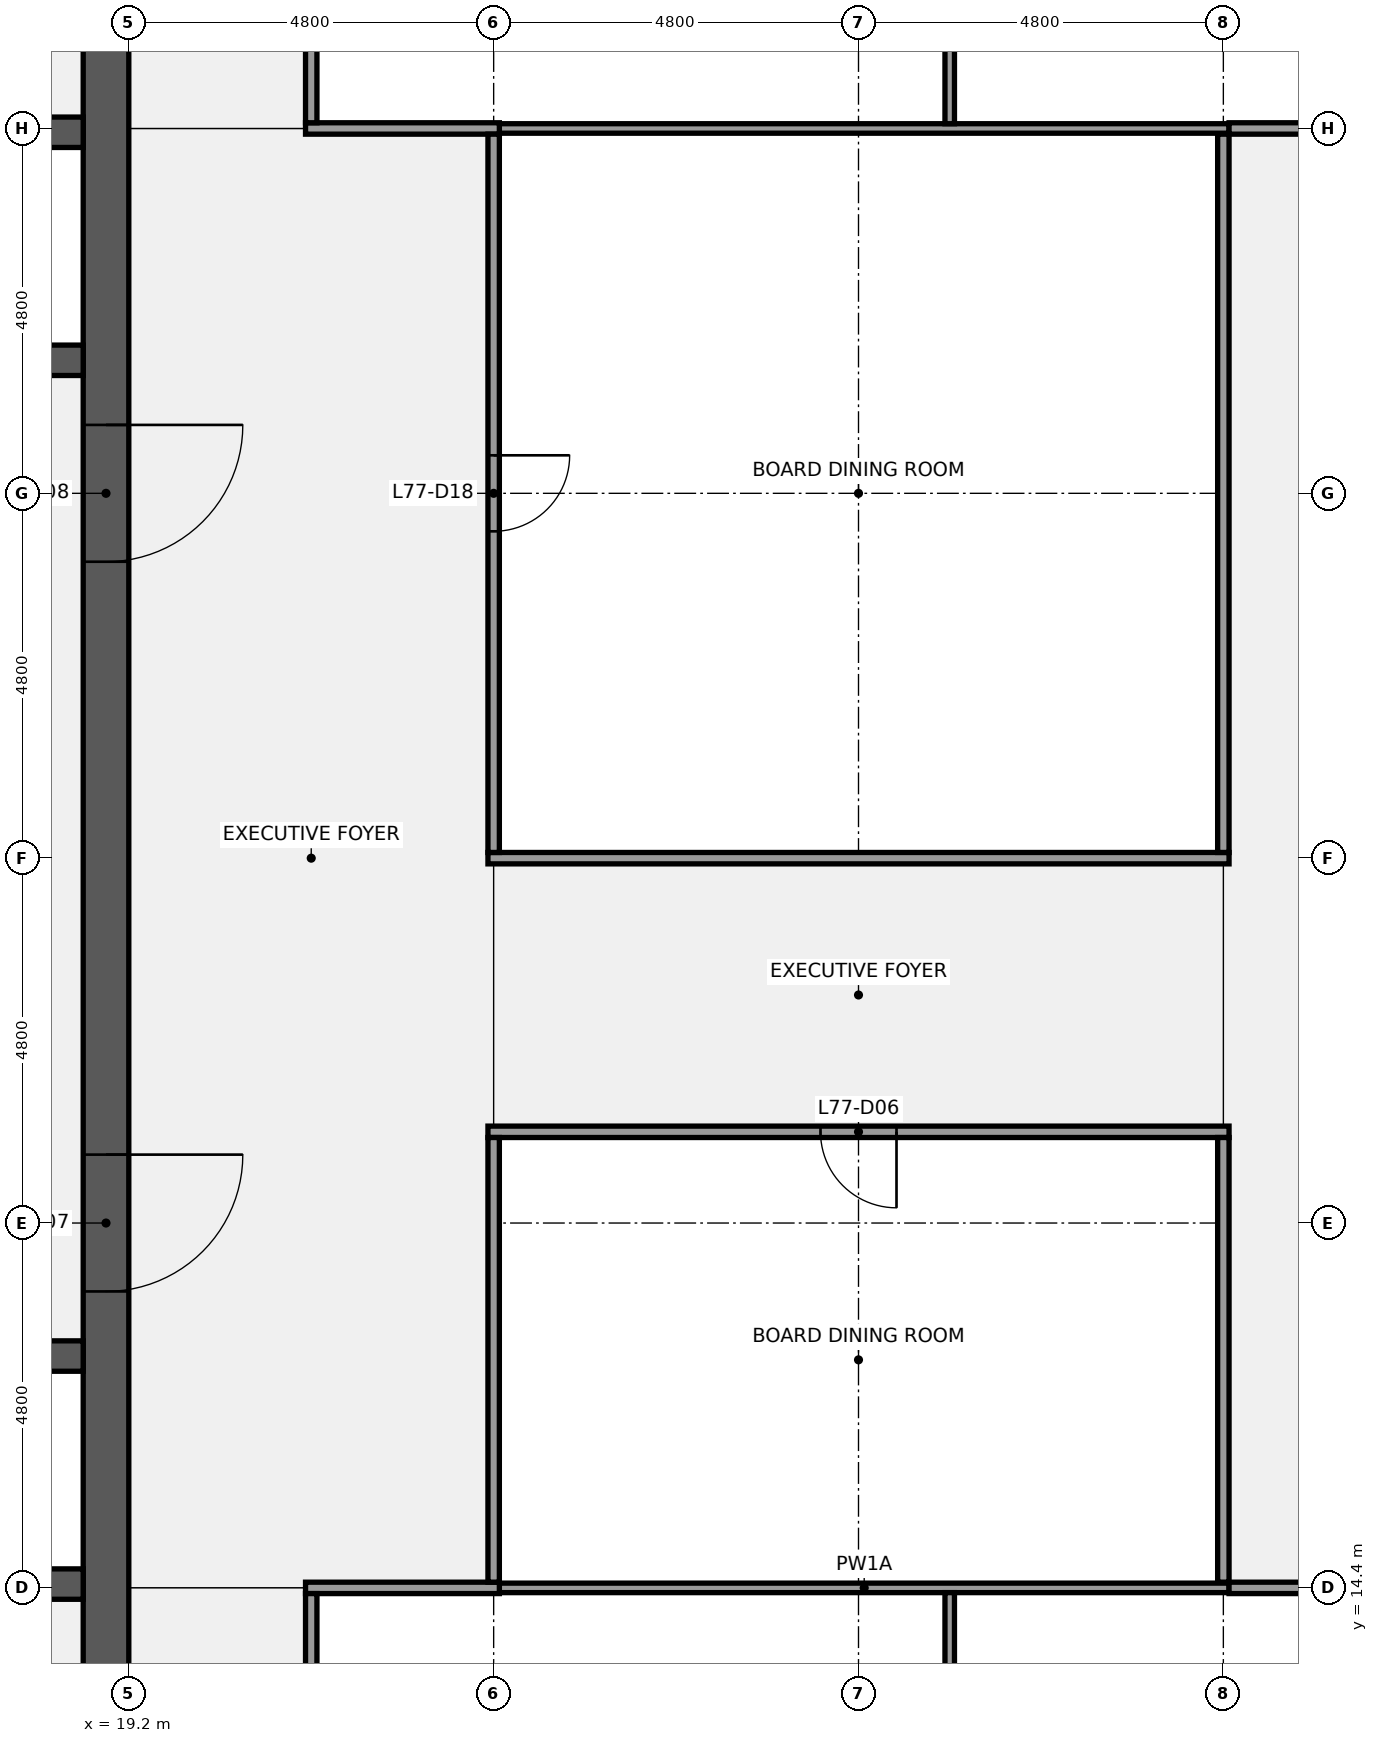
"""IFC4 building model, lengths in metres.
Left out: names, types, materials, properties, quantities, classifications, styles, units other than length and angle.
Written with IfcOpenShell. Run it as: python <this file> out.ifc"""

import sys

from ifc_helpers import new_model, si_unit, direction, frame, frame_2d, origin, place, context, subcontext, project, spatial, rectangle, extrude, element, fill, save


model = new_model("IFC4")
c1 = context("Model", 3, precision=1e-05, world=origin(), true_north=direction((0.0, 1.0)))
c2 = subcontext(c1, "Body", "Model", "MODEL_VIEW")
j1 = project(units=[si_unit("LENGTHUNIT", "METRE"), si_unit("PLANEANGLEUNIT", "RADIAN")], contexts=[c1])
p1 = place(None, origin())
s1 = spatial("IfcSite", under=j1, at=p1, CompositionType="ELEMENT")
p2 = place(p1, origin())
s2 = spatial("IfcBuilding", under=s1, at=p2, CompositionType="ELEMENT")
p3 = place(p2, frame((0.0, 0.0, 346.3)))
s3 = spatial("IfcBuildingStorey", under=s2, at=p3, CompositionType="ELEMENT", Elevation=346.3)
p4 = place(p3, frame((18.9, 38.4, 0.0), z_axis=(0.0, 0.0, 1.0), x_axis=(0.0, -1.0, 0.0)))
e1 = element("IfcWall", 1, at=p4, inside=s3, PredefinedType="SHEAR", context=c2, shape_type="SweptSolid", body=[
    extrude(rectangle(XDim=28.8, YDim=0.6, at=frame_2d((14.4, 0.0))), origin(), (0.0, 0.0, 1.0), 3.84),
])
p5 = place(p4, frame((18.3, 0.0, 0.0)))
e2 = element("IfcOpeningElement", 2, at=p5, cuts=e1, PredefinedType="OPENING", context=c2, shape_type="SweptSolid", body=[
    extrude(rectangle(XDim=1.8, YDim=2.1, at=frame_2d((0.9, 1.05))), frame((0.0, 0.31, 0.0), z_axis=(0.0, -1.0, 0.0), x_axis=(1.0, 0.0, 0.0)), (0.0, 0.0, 1.0), 0.62),
])
p6 = place(p4, frame((8.7, 0.0, 0.0)))
e3 = element("IfcOpeningElement", 3, at=p6, cuts=e1, PredefinedType="OPENING", context=c2, shape_type="SweptSolid", body=[
    extrude(rectangle(XDim=1.8, YDim=2.1, at=frame_2d((0.9, 1.05))), frame((0.0, 0.31, 0.0), z_axis=(0.0, -1.0, 0.0), x_axis=(1.0, 0.0, 0.0)), (0.0, 0.0, 1.0), 0.62),
])
p7 = place(p3, frame((0.6, 14.45, 0.0), z_axis=(0.0, 0.0, 1.0), x_axis=(1.0, 0.0, 0.0)))
e4 = element("IfcWall", 4, at=p7, inside=s3, PredefinedType="SHEAR", context=c2, shape_type="SweptSolid", body=[
    extrude(rectangle(XDim=18.0, YDim=0.4, at=frame_2d((9.0, 0.0))), origin(), (0.0, 0.0, 1.0), 3.84),
])
p8 = place(p3, frame((0.6, 17.45, 0.0), z_axis=(0.0, 0.0, 1.0), x_axis=(1.0, 0.0, 0.0)))
e5 = element("IfcWall", 5, at=p8, inside=s3, PredefinedType="SHEAR", context=c2, shape_type="SweptSolid", body=[
    extrude(rectangle(XDim=18.0, YDim=0.4, at=frame_2d((9.0, 0.0))), origin(), (0.0, 0.0, 1.0), 3.84),
])
p9 = place(p8, frame((3.363, 0.0, 0.0)))
e6 = element("IfcOpeningElement", 6, at=p9, cuts=e5, PredefinedType="OPENING", context=c2, shape_type="SweptSolid", body=[
    extrude(rectangle(XDim=1.0, YDim=2.1, at=frame_2d((0.5, 1.05))), frame((0.0, 0.21, 0.0), z_axis=(0.0, -1.0, 0.0), x_axis=(1.0, 0.0, 0.0)), (0.0, 0.0, 1.0), 0.42),
])
p10 = place(p8, frame((9.1, 0.0, 0.0)))
e7 = element("IfcOpeningElement", 7, at=p10, cuts=e5, PredefinedType="OPENING", context=c2, shape_type="SweptSolid", body=[
    extrude(rectangle(XDim=1.0, YDim=2.1, at=frame_2d((0.5, 1.05))), frame((0.0, 0.21, 0.0), z_axis=(0.0, -1.0, 0.0), x_axis=(1.0, 0.0, 0.0)), (0.0, 0.0, 1.0), 0.42),
])
p11 = place(p8, frame((12.4, 0.0, 0.0)))
e8 = element("IfcOpeningElement", 8, at=p11, cuts=e5, PredefinedType="OPENING", context=c2, shape_type="SweptSolid", body=[
    extrude(rectangle(XDim=1.0, YDim=2.1, at=frame_2d((0.5, 1.05))), frame((0.0, 0.21, 0.0), z_axis=(0.0, -1.0, 0.0), x_axis=(1.0, 0.0, 0.0)), (0.0, 0.0, 1.0), 0.42),
])
p12 = place(p8, frame((15.738, 0.0, 0.0)))
e9 = element("IfcOpeningElement", 9, at=p12, cuts=e5, PredefinedType="OPENING", context=c2, shape_type="SweptSolid", body=[
    extrude(rectangle(XDim=1.0, YDim=2.1, at=frame_2d((0.5, 1.05))), frame((0.0, 0.21, 0.0), z_axis=(0.0, -1.0, 0.0), x_axis=(1.0, 0.0, 0.0)), (0.0, 0.0, 1.0), 0.42),
])
p13 = place(p3, frame((0.6, 30.55, 0.0), z_axis=(0.0, 0.0, 1.0), x_axis=(1.0, 0.0, 0.0)))
e10 = element("IfcWall", 10, at=p13, inside=s3, PredefinedType="SHEAR", context=c2, shape_type="SweptSolid", body=[
    extrude(rectangle(XDim=18.0, YDim=0.4, at=frame_2d((9.0, 0.0))), origin(), (0.0, 0.0, 1.0), 3.84),
])
p14 = place(p13, frame((1.6, 0.0, 0.0)))
e11 = element("IfcOpeningElement", 11, at=p14, cuts=e10, PredefinedType="OPENING", context=c2, shape_type="SweptSolid", body=[
    extrude(rectangle(XDim=1.2, YDim=2.1, at=frame_2d((0.6, 1.05))), frame((0.0, 0.21, 0.0), z_axis=(0.0, -1.0, 0.0), x_axis=(1.0, 0.0, 0.0)), (0.0, 0.0, 1.0), 0.42),
])
p15 = place(p13, frame((4.2, 0.0, 0.0)))
e12 = element("IfcOpeningElement", 12, at=p15, cuts=e10, PredefinedType="OPENING", context=c2, shape_type="SweptSolid", body=[
    extrude(rectangle(XDim=1.2, YDim=2.1, at=frame_2d((0.6, 1.05))), frame((0.0, 0.21, 0.0), z_axis=(0.0, -1.0, 0.0), x_axis=(1.0, 0.0, 0.0)), (0.0, 0.0, 1.0), 0.42),
])
p16 = place(p13, frame((6.8, 0.0, 0.0)))
e13 = element("IfcOpeningElement", 13, at=p16, cuts=e10, PredefinedType="OPENING", context=c2, shape_type="SweptSolid", body=[
    extrude(rectangle(XDim=1.2, YDim=2.1, at=frame_2d((0.6, 1.05))), frame((0.0, 0.21, 0.0), z_axis=(0.0, -1.0, 0.0), x_axis=(1.0, 0.0, 0.0)), (0.0, 0.0, 1.0), 0.42),
])
p17 = place(p13, frame((10.0, 0.0, 0.0)))
e14 = element("IfcOpeningElement", 14, at=p17, cuts=e10, PredefinedType="OPENING", context=c2, shape_type="SweptSolid", body=[
    extrude(rectangle(XDim=1.2, YDim=2.1, at=frame_2d((0.6, 1.05))), frame((0.0, 0.21, 0.0), z_axis=(0.0, -1.0, 0.0), x_axis=(1.0, 0.0, 0.0)), (0.0, 0.0, 1.0), 0.42),
])
p18 = place(p13, frame((12.6, 0.0, 0.0)))
e15 = element("IfcOpeningElement", 15, at=p18, cuts=e10, PredefinedType="OPENING", context=c2, shape_type="SweptSolid", body=[
    extrude(rectangle(XDim=1.2, YDim=2.1, at=frame_2d((0.6, 1.05))), frame((0.0, 0.21, 0.0), z_axis=(0.0, -1.0, 0.0), x_axis=(1.0, 0.0, 0.0)), (0.0, 0.0, 1.0), 0.42),
])
p19 = place(p13, frame((15.2, 0.0, 0.0)))
e16 = element("IfcOpeningElement", 16, at=p19, cuts=e10, PredefinedType="OPENING", context=c2, shape_type="SweptSolid", body=[
    extrude(rectangle(XDim=1.2, YDim=2.1, at=frame_2d((0.6, 1.05))), frame((0.0, 0.21, 0.0), z_axis=(0.0, -1.0, 0.0), x_axis=(1.0, 0.0, 0.0)), (0.0, 0.0, 1.0), 0.42),
])
p20 = place(p3, frame((0.6, 33.55, 0.0), z_axis=(0.0, 0.0, 1.0), x_axis=(1.0, 0.0, 0.0)))
e17 = element("IfcWall", 17, at=p20, inside=s3, PredefinedType="SHEAR", context=c2, shape_type="SweptSolid", body=[
    extrude(rectangle(XDim=18.0, YDim=0.4, at=frame_2d((9.0, 0.0))), origin(), (0.0, 0.0, 1.0), 3.84),
])
p21 = place(p3, frame((24.075, 14.4, 0.0), z_axis=(0.0, 0.0, 1.0), x_axis=(1.0, 0.0, 0.0)))
e18 = element("IfcWall", 18, at=p21, inside=s3, PredefinedType="PARTITIONING", context=c2, shape_type="SweptSolid", body=[
    extrude(rectangle(XDim=9.6, YDim=0.125, at=frame_2d((4.8, 0.0))), origin(), (0.0, 0.0, 1.0), 2.849),
])
p22 = place(p3, frame((21.525, 14.4, 0.0), z_axis=(0.0, 0.0, 1.0), x_axis=(1.0, 0.0, 0.0)))
e19 = element("IfcWall", 19, at=p22, inside=s3, PredefinedType="PARTITIONING", context=c2, shape_type="SweptSolid", body=[
    extrude(rectangle(XDim=2.55, YDim=0.15, at=frame_2d((1.275, 0.0))), origin(), (0.0, 0.0, 1.0), 2.849),
])
p23 = place(p3, frame((33.675, 14.4, 0.0), z_axis=(0.0, 0.0, 1.0), x_axis=(1.0, 0.0, 0.0)))
e20 = element("IfcWall", 20, at=p23, inside=s3, PredefinedType="PARTITIONING", context=c2, shape_type="SweptSolid", body=[
    extrude(rectangle(XDim=2.4, YDim=0.15, at=frame_2d((1.2, 0.0))), origin(), (0.0, 0.0, 1.0), 2.849),
])
p24 = place(p3, frame((23.925, 20.4, 0.0), z_axis=(0.0, 0.0, 1.0), x_axis=(1.0, 0.0, 0.0)))
e21 = element("IfcWall", 21, at=p24, inside=s3, PredefinedType="PARTITIONING", context=c2, shape_type="SweptSolid", body=[
    extrude(rectangle(XDim=9.75, YDim=0.15, at=frame_2d((4.875, 0.0))), origin(), (0.0, 0.0, 1.0), 2.849),
])
p25 = place(p24, frame((4.375, 0.0, 0.0)))
e22 = element("IfcOpeningElement", 22, at=p25, cuts=e21, PredefinedType="OPENING", context=c2, shape_type="SweptSolid", body=[
    extrude(rectangle(XDim=1.0, YDim=2.1, at=frame_2d((0.5, 1.05))), frame((0.0, 0.085, 0.0), z_axis=(0.0, -1.0, 0.0), x_axis=(1.0, 0.0, 0.0)), (0.0, 0.0, 1.0), 0.17),
])
p26 = place(p3, frame((23.925, 24.0, 0.0), z_axis=(0.0, 0.0, 1.0), x_axis=(1.0, 0.0, 0.0)))
e23 = element("IfcWall", 23, at=p26, inside=s3, PredefinedType="PARTITIONING", context=c2, shape_type="SweptSolid", body=[
    extrude(rectangle(XDim=9.75, YDim=0.15, at=frame_2d((4.875, 0.0))), origin(), (0.0, 0.0, 1.0), 2.849),
])
p27 = place(p3, frame((24.075, 33.6, 0.0), z_axis=(0.0, 0.0, 1.0), x_axis=(1.0, 0.0, 0.0)))
e24 = element("IfcWall", 24, at=p27, inside=s3, PredefinedType="PARTITIONING", context=c2, shape_type="SweptSolid", body=[
    extrude(rectangle(XDim=9.6, YDim=0.125, at=frame_2d((4.8, 0.0))), origin(), (0.0, 0.0, 1.0), 2.849),
])
p28 = place(p3, frame((21.525, 33.6, 0.0), z_axis=(0.0, 0.0, 1.0), x_axis=(1.0, 0.0, 0.0)))
e25 = element("IfcWall", 25, at=p28, inside=s3, PredefinedType="PARTITIONING", context=c2, shape_type="SweptSolid", body=[
    extrude(rectangle(XDim=2.55, YDim=0.15, at=frame_2d((1.275, 0.0))), origin(), (0.0, 0.0, 1.0), 2.849),
])
p29 = place(p3, frame((33.675, 33.6, 0.0), z_axis=(0.0, 0.0, 1.0), x_axis=(1.0, 0.0, 0.0)))
e26 = element("IfcWall", 26, at=p29, inside=s3, PredefinedType="PARTITIONING", context=c2, shape_type="SweptSolid", body=[
    extrude(rectangle(XDim=2.4, YDim=0.15, at=frame_2d((1.2, 0.0))), origin(), (0.0, 0.0, 1.0), 2.849),
])
for number, where, z_axis, x_axis in (
    (27, (21.6, 9.675, 0.0), (0.0, 0.0, 1.0), (0.0, 1.0, 0.0)),
    (28, (21.6, 33.675, 0.0), (0.0, 0.0, 1.0), (0.0, 1.0, 0.0)),
):
    element("IfcWall", number, at=place(p3, frame(where, z_axis=z_axis, x_axis=x_axis)), inside=s3, PredefinedType="PARTITIONING", context=c2, shape_type="SweptSolid", body=[
        extrude(rectangle(XDim=4.65, YDim=0.15, at=frame_2d((2.325, 0.0))), origin(), (0.0, 0.0, 1.0), 2.849),
    ])
p30 = place(p3, frame((24.0, 14.475, 0.0), z_axis=(0.0, 0.0, 1.0), x_axis=(0.0, 1.0, 0.0)))
e29 = element("IfcWall", 29, at=p30, inside=s3, PredefinedType="PARTITIONING", context=c2, shape_type="SweptSolid", body=[
    extrude(rectangle(XDim=5.85, YDim=0.15, at=frame_2d((2.925, 0.0))), origin(), (0.0, 0.0, 1.0), 2.849),
])
p31 = place(p3, frame((24.0, 24.075, 0.0), z_axis=(0.0, 0.0, 1.0), x_axis=(0.0, 1.0, 0.0)))
e30 = element("IfcWall", 30, at=p31, inside=s3, PredefinedType="PARTITIONING", context=c2, shape_type="SweptSolid", body=[
    extrude(rectangle(XDim=9.45, YDim=0.15, at=frame_2d((4.725, 0.0))), origin(), (0.0, 0.0, 1.0), 2.849),
])
p32 = place(p31, frame((4.225, 0.0, 0.0)))
e31 = element("IfcOpeningElement", 31, at=p32, cuts=e30, PredefinedType="OPENING", context=c2, shape_type="SweptSolid", body=[
    extrude(rectangle(XDim=1.0, YDim=2.1, at=frame_2d((0.5, 1.05))), frame((0.0, 0.085, 0.0), z_axis=(0.0, -1.0, 0.0), x_axis=(1.0, 0.0, 0.0)), (0.0, 0.0, 1.0), 0.17),
])
for number, where, z_axis, x_axis in (
    (32, (30.0, 9.675, 0.0), (0.0, 0.0, 1.0), (0.0, 1.0, 0.0)),
    (33, (30.0, 33.663, 0.0), (0.0, 0.0, 1.0), (0.0, 1.0, 0.0)),
):
    element("IfcWall", number, at=place(p3, frame(where, z_axis=z_axis, x_axis=x_axis)), inside=s3, PredefinedType="PARTITIONING", context=c2, shape_type="SweptSolid", body=[
        extrude(rectangle(XDim=4.662, YDim=0.125, at=frame_2d((2.331, 0.0))), origin(), (0.0, 0.0, 1.0), 2.849),
    ])
p33 = place(p3, frame((33.6, 14.475, 0.0), z_axis=(0.0, 0.0, 1.0), x_axis=(0.0, 1.0, 0.0)))
e34 = element("IfcWall", 34, at=p33, inside=s3, PredefinedType="PARTITIONING", context=c2, shape_type="SweptSolid", body=[
    extrude(rectangle(XDim=5.85, YDim=0.15, at=frame_2d((2.925, 0.0))), origin(), (0.0, 0.0, 1.0), 2.849),
])
p34 = place(p3, frame((33.6, 24.075, 0.0), z_axis=(0.0, 0.0, 1.0), x_axis=(0.0, 1.0, 0.0)))
e35 = element("IfcWall", 35, at=p34, inside=s3, PredefinedType="PARTITIONING", context=c2, shape_type="SweptSolid", body=[
    extrude(rectangle(XDim=9.45, YDim=0.15, at=frame_2d((4.725, 0.0))), origin(), (0.0, 0.0, 1.0), 2.849),
])
p35 = place(p5, origin())
e36 = element("IfcDoor", 36, at=p35, inside=s3, OperationType="DOUBLE_DOOR_SINGLE_SWING", PredefinedType="DOOR", context=c2, shape_type="SweptSolid", body=[
    extrude(rectangle(XDim=1.8, YDim=2.1, at=frame_2d((0.9, 1.05))), frame((0.0, 0.025, 0.0), z_axis=(0.0, -1.0, 0.0), x_axis=(1.0, 0.0, 0.0)), (0.0, 0.0, 1.0), 0.05),
])
fill(e2, e36)
p36 = place(p6, origin())
e37 = element("IfcDoor", 37, at=p36, inside=s3, OperationType="DOUBLE_DOOR_SINGLE_SWING", PredefinedType="DOOR", context=c2, shape_type="SweptSolid", body=[
    extrude(rectangle(XDim=1.8, YDim=2.1, at=frame_2d((0.9, 1.05))), frame((0.0, 0.025, 0.0), z_axis=(0.0, -1.0, 0.0), x_axis=(1.0, 0.0, 0.0)), (0.0, 0.0, 1.0), 0.05),
])
fill(e3, e37)
p37 = place(p25, origin())
e38 = element("IfcDoor", 38, at=p37, inside=s3, OperationType="SINGLE_SWING_RIGHT", PredefinedType="DOOR", context=c2, shape_type="SweptSolid", body=[
    extrude(rectangle(XDim=1.0, YDim=2.1, at=frame_2d((0.5, 1.05))), frame((0.0, 0.025, 0.0), z_axis=(0.0, -1.0, 0.0), x_axis=(1.0, 0.0, 0.0)), (0.0, 0.0, 1.0), 0.05),
])
fill(e22, e38)
p38 = place(p32, origin())
e39 = element("IfcDoor", 39, at=p38, inside=s3, OperationType="SINGLE_SWING_RIGHT", PredefinedType="DOOR", context=c2, shape_type="SweptSolid", body=[
    extrude(rectangle(XDim=1.0, YDim=2.1, at=frame_2d((0.5, 1.05))), frame((0.0, 0.025, 0.0), z_axis=(0.0, -1.0, 0.0), x_axis=(1.0, 0.0, 0.0)), (0.0, 0.0, 1.0), 0.05),
])
fill(e31, e39)
save(model, sys.argv[1])
